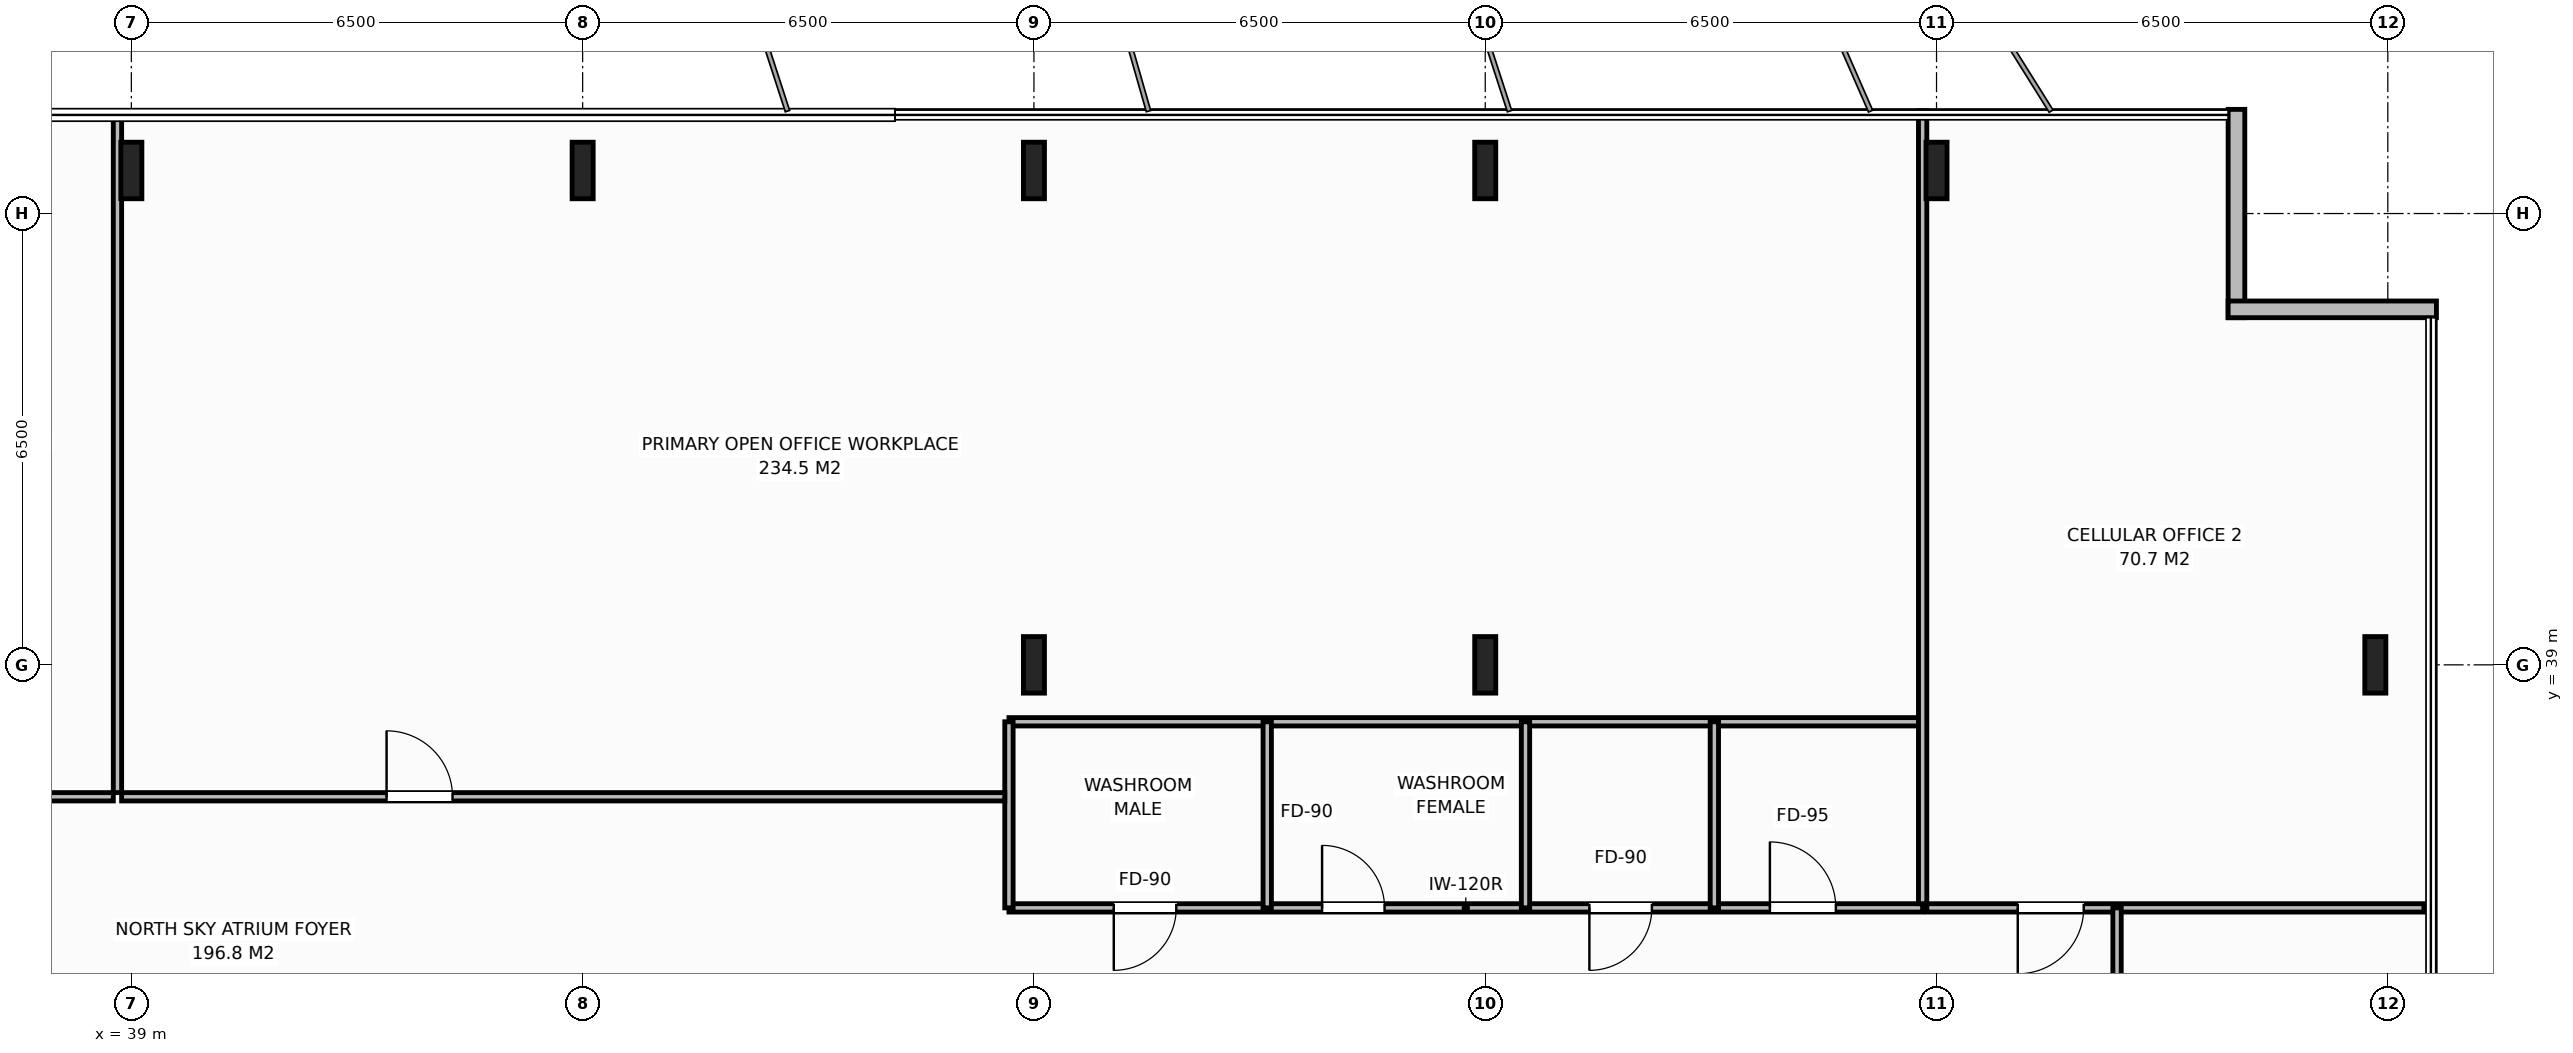
"""IFC4 building model, lengths in metres.
Left out: names, types, materials, properties, quantities, classifications, styles, units other than length and angle.
Written with IfcOpenShell. Run it as: python <this file> out.ifc"""

import sys

from ifc_helpers import new_model, si_unit, direction, frame, frame_2d, origin, origin_2d, place, context, subcontext, project, spatial, rectangle, i_section, extrude, element, fill, save


model = new_model("IFC4")
c1 = context("Model", 3, precision=1e-05, world=origin(), true_north=direction((0.0, 1.0)))
c2 = subcontext(c1, "Body", "Model", "MODEL_VIEW")
j1 = project(units=[si_unit("LENGTHUNIT", "METRE"), si_unit("PLANEANGLEUNIT", "RADIAN")], contexts=[c1])
p1 = place(None, origin())
s1 = spatial("IfcSite", under=j1, at=p1, CompositionType="ELEMENT")
p2 = place(p1, origin())
s2 = spatial("IfcBuilding", under=s1, at=p2, CompositionType="ELEMENT")
p3 = place(p2, frame((0.0, 0.0, 248.0)))
s3 = spatial("IfcBuildingStorey", under=s2, at=p3, CompositionType="ELEMENT", Elevation=248.0)
for number, where, z_axis, x_axis in (
    (1, (58.5, 39.0, 0.0), (0.0, 0.0, 1.0), (1.0, 0.0, 0.0)),
    (2, (52.0, 39.0, 0.0), (0.0, 0.0, 1.0), (1.0, 0.0, 0.0)),
    (3, (39.0, 46.12, 0.0), (0.0, 0.0, 1.0), (1.0, 0.0, 0.0)),
    (4, (45.5, 46.12, 0.0), (0.0, 0.0, 1.0), (1.0, 0.0, 0.0)),
    (5, (52.0, 46.12, 0.0), (0.0, 0.0, 1.0), (1.0, 0.0, 0.0)),
    (6, (58.5, 46.12, 0.0), (0.0, 0.0, 1.0), (1.0, 0.0, 0.0)),
    (7, (65.0, 46.12, 0.0), (0.0, 0.0, 1.0), (1.0, 0.0, 0.0)),
    (8, (71.32, 39.0, 0.0), (0.0, 0.0, 1.0), (1.0, 0.0, 0.0)),
):
    element("IfcColumn", number, at=place(p3, frame(where, z_axis=z_axis, x_axis=x_axis)), inside=s3, PredefinedType="COLUMN", context=c2, shape_type="SweptSolid", body=[
        extrude(i_section(OverallWidth=0.303, OverallDepth=0.814, WebThickness=0.021, FlangeThickness=0.04, at=origin_2d()), origin(), (0.0, 0.0, 1.0), 3.8),
    ])
for number, where, z_axis, x_axis in (
    (9, (69.32, 47.0, 0.0), (0.0, 0.0, 1.0), (0.0, -1.0, 0.0)),
    (10, (69.2, 44.12, 0.0), (0.0, 0.0, 1.0), (1.0, 0.0, 0.0)),
):
    element("IfcWall", number, at=place(p3, frame(where, z_axis=z_axis, x_axis=x_axis)), inside=s3, PredefinedType="STANDARD", context=c2, shape_type="SweptSolid", body=[
        extrude(rectangle(XDim=3.0, YDim=0.24, at=frame_2d((1.5, 0.0))), origin(), (0.0, 0.0, 1.0), 3.58),
    ])
p4 = place(p3, frame((51.64, 35.5, 0.0), z_axis=(0.0, 0.0, 1.0), x_axis=(1.0, 0.0, 0.0)))
e11 = element("IfcWall", 11, at=p4, inside=s3, PredefinedType="PARTITIONING", context=c2, shape_type="SweptSolid", body=[
    extrude(rectangle(XDim=13.16, YDim=0.12, at=frame_2d((6.58, 0.0))), origin(), (0.0, 0.0, 1.0), 3.58),
])
p5 = place(p4, frame((1.51, 0.0, 0.0)))
e12 = element("IfcOpeningElement", 12, at=p5, cuts=e11, PredefinedType="OPENING", context=c2, shape_type="SweptSolid", body=[
    extrude(rectangle(XDim=0.9, YDim=2.15, at=frame_2d((0.45, 1.075))), frame((0.0, 0.07, 0.0), z_axis=(0.0, -1.0, 0.0), x_axis=(1.0, 0.0, 0.0)), (0.0, 0.0, 1.0), 0.14),
])
p6 = place(p4, frame((4.51, 0.0, 0.0)))
e13 = element("IfcOpeningElement", 13, at=p6, cuts=e11, PredefinedType="OPENING", context=c2, shape_type="SweptSolid", body=[
    extrude(rectangle(XDim=0.9, YDim=2.15, at=frame_2d((0.45, 1.075))), frame((0.0, 0.07, 0.0), z_axis=(0.0, -1.0, 0.0), x_axis=(1.0, 0.0, 0.0)), (0.0, 0.0, 1.0), 0.14),
])
p7 = place(p4, frame((8.36, 0.0, 0.0)))
e14 = element("IfcOpeningElement", 14, at=p7, cuts=e11, PredefinedType="OPENING", context=c2, shape_type="SweptSolid", body=[
    extrude(rectangle(XDim=0.9, YDim=2.15, at=frame_2d((0.45, 1.075))), frame((0.0, 0.07, 0.0), z_axis=(0.0, -1.0, 0.0), x_axis=(1.0, 0.0, 0.0)), (0.0, 0.0, 1.0), 0.14),
])
p8 = place(p4, frame((10.96, 0.0, 0.0)))
e15 = element("IfcOpeningElement", 15, at=p8, cuts=e11, PredefinedType="OPENING", context=c2, shape_type="SweptSolid", body=[
    extrude(rectangle(XDim=0.95, YDim=2.15, at=frame_2d((0.475, 1.075))), frame((0.0, 0.07, 0.0), z_axis=(0.0, -1.0, 0.0), x_axis=(1.0, 0.0, 0.0)), (0.0, 0.0, 1.0), 0.14),
])
p9 = place(p3, frame((51.64, 38.18, 0.0), z_axis=(0.0, 0.0, 1.0), x_axis=(1.0, 0.0, 0.0)))
e16 = element("IfcWall", 16, at=p9, inside=s3, PredefinedType="PARTITIONING", context=c2, shape_type="SweptSolid", body=[
    extrude(rectangle(XDim=13.16, YDim=0.12, at=frame_2d((6.58, 0.0))), origin(), (0.0, 0.0, 1.0), 3.58),
])
for number, where, z_axis, x_axis in (
    (17, (51.64, 35.5, 0.0), (0.0, 0.0, 1.0), (0.0, 1.0, 0.0)),
    (18, (55.36, 35.5, 0.0), (0.0, 0.0, 1.0), (0.0, 1.0, 0.0)),
    (19, (59.08, 35.5, 0.0), (0.0, 0.0, 1.0), (0.0, 1.0, 0.0)),
    (20, (61.8, 35.5, 0.0), (0.0, 0.0, 1.0), (0.0, 1.0, 0.0)),
):
    element("IfcWall", number, at=place(p3, frame(where, z_axis=z_axis, x_axis=x_axis)), inside=s3, PredefinedType="PARTITIONING", context=c2, shape_type="SweptSolid", body=[
        extrude(rectangle(XDim=2.68, YDim=0.12, at=frame_2d((1.34, 0.0))), origin(), (0.0, 0.0, 1.0), 3.58),
    ])
p10 = place(p3, frame((38.8, 37.16, 0.0), z_axis=(0.0, 0.0, 1.0), x_axis=(0.0, 1.0, 0.0)))
e21 = element("IfcWall", 21, at=p10, inside=s3, PredefinedType="PARTITIONING", context=c2, shape_type="SweptSolid", body=[
    extrude(rectangle(XDim=9.82, YDim=0.12, at=frame_2d((4.91, 0.0))), origin(), (0.0, 0.0, 1.0), 2.88),
])
p11 = place(p3, frame((34.67, 37.1, 0.0), z_axis=(0.0, 0.0, 1.0), x_axis=(1.0, 0.0, 0.0)))
e22 = element("IfcWall", 22, at=p11, inside=s3, PredefinedType="PARTITIONING", context=c2, shape_type="SweptSolid", body=[
    extrude(rectangle(XDim=4.07, YDim=0.12, at=frame_2d((2.035, 0.0))), origin(), (0.0, 0.0, 1.0), 3.58),
])
p12 = place(p11, frame((1.56, 0.0, 0.0)))
e23 = element("IfcOpeningElement", 23, at=p12, cuts=e22, PredefinedType="OPENING", context=c2, shape_type="SweptSolid", body=[
    extrude(rectangle(XDim=0.95, YDim=2.15, at=frame_2d((0.475, 1.075))), frame((0.0, 0.07, 0.0), z_axis=(0.0, -1.0, 0.0), x_axis=(1.0, 0.0, 0.0)), (0.0, 0.0, 1.0), 0.14),
])
p13 = place(p3, frame((64.8, 35.56, 0.0), z_axis=(0.0, 0.0, 1.0), x_axis=(0.0, 1.0, 0.0)))
e24 = element("IfcWall", 24, at=p13, inside=s3, PredefinedType="PARTITIONING", context=c2, shape_type="SweptSolid", body=[
    extrude(rectangle(XDim=11.42, YDim=0.12, at=frame_2d((5.71, 0.0))), origin(), (0.0, 0.0, 1.0), 2.88),
])
p14 = place(p3, frame((38.86, 37.1, 0.0), z_axis=(0.0, 0.0, 1.0), x_axis=(1.0, 0.0, 0.0)))
e25 = element("IfcWall", 25, at=p14, inside=s3, PredefinedType="PARTITIONING", context=c2, shape_type="SweptSolid", body=[
    extrude(rectangle(XDim=12.72, YDim=0.12, at=frame_2d((6.36, 0.0))), origin(), (0.0, 0.0, 1.0), 3.58),
])
p15 = place(p14, frame((3.816, 0.0, 0.0)))
e26 = element("IfcOpeningElement", 26, at=p15, cuts=e25, PredefinedType="OPENING", context=c2, shape_type="SweptSolid", body=[
    extrude(rectangle(XDim=0.95, YDim=2.15, at=frame_2d((0.475, 1.075))), frame((0.0, 0.07, 0.0), z_axis=(0.0, -1.0, 0.0), x_axis=(1.0, 0.0, 0.0)), (0.0, 0.0, 1.0), 0.14),
])
p16 = place(p3, frame((64.86, 35.5, 0.0), z_axis=(0.0, 0.0, 1.0), x_axis=(1.0, 0.0, 0.0)))
e27 = element("IfcWall", 27, at=p16, inside=s3, PredefinedType="PARTITIONING", context=c2, shape_type="SweptSolid", body=[
    extrude(rectangle(XDim=7.16, YDim=0.12, at=frame_2d((3.58, 0.0))), origin(), (0.0, 0.0, 1.0), 3.58),
])
p17 = place(p16, frame((1.31, 0.0, 0.0)))
e28 = element("IfcOpeningElement", 28, at=p17, cuts=e27, PredefinedType="OPENING", context=c2, shape_type="SweptSolid", body=[
    extrude(rectangle(XDim=0.95, YDim=2.15, at=frame_2d((0.475, 1.075))), frame((0.0, 0.07, 0.0), z_axis=(0.0, -1.0, 0.0), x_axis=(1.0, 0.0, 0.0)), (0.0, 0.0, 1.0), 0.14),
])
p18 = place(p3, frame((67.6, 16.5, 0.0), z_axis=(0.0, 0.0, 1.0), x_axis=(0.0, 1.0, 0.0)))
e29 = element("IfcWall", 29, at=p18, inside=s3, PredefinedType="PARTITIONING", context=c2, shape_type="SweptSolid", body=[
    extrude(rectangle(XDim=19.0, YDim=0.12, at=frame_2d((9.5, 0.0))), origin(), (0.0, 0.0, 1.0), 3.58),
])
p19 = place(p18, frame((9.025, 0.0, 0.0)))
e30 = element("IfcOpeningElement", 30, at=p19, cuts=e29, PredefinedType="OPENING", context=c2, shape_type="SweptSolid", body=[
    extrude(rectangle(XDim=0.95, YDim=2.15, at=frame_2d((0.475, 1.075))), frame((0.0, 0.07, 0.0), z_axis=(0.0, -1.0, 0.0), x_axis=(1.0, 0.0, 0.0)), (0.0, 0.0, 1.0), 0.14),
])
p20 = place(p5, origin())
e31 = element("IfcDoor", 31, at=p20, inside=s3, OperationType="SINGLE_SWING_RIGHT", PredefinedType="DOOR", context=c2, shape_type="SweptSolid", body=[
    extrude(rectangle(XDim=0.9, YDim=2.15, at=frame_2d((0.45, 1.075))), frame((0.0, 0.025, 0.0), z_axis=(0.0, -1.0, 0.0), x_axis=(1.0, 0.0, 0.0)), (0.0, 0.0, 1.0), 0.05),
])
fill(e12, e31)
p21 = place(p6, origin())
e32 = element("IfcDoor", 32, at=p21, inside=s3, OperationType="SINGLE_SWING_LEFT", PredefinedType="DOOR", context=c2, shape_type="SweptSolid", body=[
    extrude(rectangle(XDim=0.9, YDim=2.15, at=frame_2d((0.45, 1.075))), frame((0.0, 0.025, 0.0), z_axis=(0.0, -1.0, 0.0), x_axis=(1.0, 0.0, 0.0)), (0.0, 0.0, 1.0), 0.05),
])
fill(e13, e32)
p22 = place(p7, origin())
e33 = element("IfcDoor", 33, at=p22, inside=s3, OperationType="SINGLE_SWING_RIGHT", PredefinedType="DOOR", context=c2, shape_type="SweptSolid", body=[
    extrude(rectangle(XDim=0.9, YDim=2.15, at=frame_2d((0.45, 1.075))), frame((0.0, 0.025, 0.0), z_axis=(0.0, -1.0, 0.0), x_axis=(1.0, 0.0, 0.0)), (0.0, 0.0, 1.0), 0.05),
])
fill(e14, e33)
p23 = place(p8, origin())
e34 = element("IfcDoor", 34, at=p23, inside=s3, OperationType="SINGLE_SWING_LEFT", PredefinedType="DOOR", context=c2, shape_type="SweptSolid", body=[
    extrude(rectangle(XDim=0.95, YDim=2.15, at=frame_2d((0.475, 1.075))), frame((0.0, 0.025, 0.0), z_axis=(0.0, -1.0, 0.0), x_axis=(1.0, 0.0, 0.0)), (0.0, 0.0, 1.0), 0.05),
])
fill(e15, e34)
p24 = place(p15, origin())
e35 = element("IfcDoor", 35, at=p24, inside=s3, OperationType="SINGLE_SWING_LEFT", PredefinedType="DOOR", context=c2, shape_type="SweptSolid", body=[
    extrude(rectangle(XDim=0.95, YDim=2.15, at=frame_2d((0.475, 1.075))), frame((0.0, 0.025, 0.0), z_axis=(0.0, -1.0, 0.0), x_axis=(1.0, 0.0, 0.0)), (0.0, 0.0, 1.0), 0.05),
])
fill(e26, e35)
p25 = place(p17, origin())
e36 = element("IfcDoor", 36, at=p25, inside=s3, OperationType="SINGLE_SWING_RIGHT", PredefinedType="DOOR", context=c2, shape_type="SweptSolid", body=[
    extrude(rectangle(XDim=0.95, YDim=2.15, at=frame_2d((0.475, 1.075))), frame((0.0, 0.025, 0.0), z_axis=(0.0, -1.0, 0.0), x_axis=(1.0, 0.0, 0.0)), (0.0, 0.0, 1.0), 0.05),
])
fill(e28, e36)
save(model, sys.argv[1])
